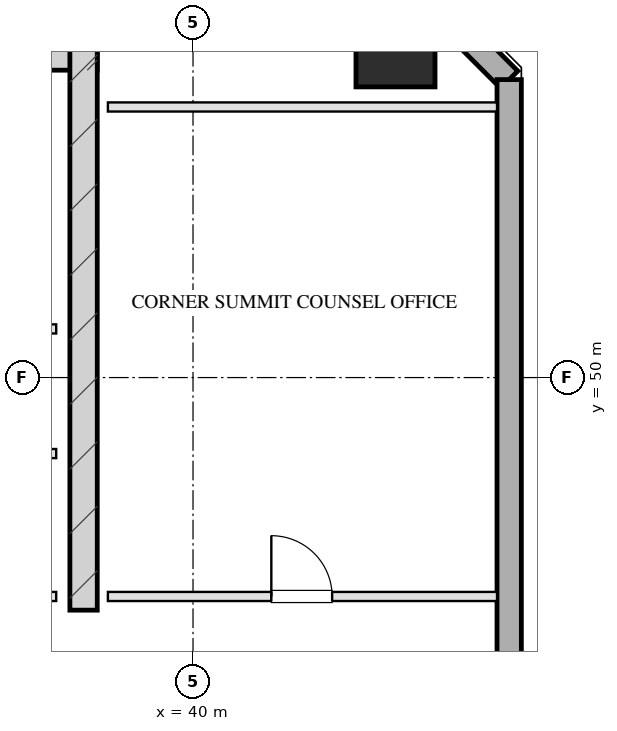
"""IFC4 building model, lengths in metres.
Left out: names, types, materials, properties, quantities, classifications, styles, units other than length and angle.
Written with IfcOpenShell. Run it as: python <this file> out.ifc"""

import sys

from ifc_helpers import new_model, si_unit, direction, frame, frame_2d, origin, origin_2d, place, context, subcontext, project, spatial, rectangle, hollow_rectangle, extrude, element, fill, save


model = new_model("IFC4")
c1 = context("Model", 3, precision=1e-05, world=origin(), true_north=direction((0.0, 1.0)))
c2 = subcontext(c1, "Body", "Model", "MODEL_VIEW")
j1 = project(units=[si_unit("LENGTHUNIT", "METRE"), si_unit("PLANEANGLEUNIT", "RADIAN")], contexts=[c1])
p1 = place(None, origin())
s1 = spatial("IfcSite", under=j1, at=p1, CompositionType="ELEMENT")
p2 = place(p1, origin())
s2 = spatial("IfcBuilding", under=s1, at=p2, CompositionType="ELEMENT")
p3 = place(p2, frame((0.0, 0.0, 263.2)))
s3 = spatial("IfcBuildingStorey", under=s2, at=p3, CompositionType="ELEMENT", Elevation=263.2)
p4 = place(p3, frame((21.575, 55.28, 0.0), z_axis=(0.0, 0.0, 1.0), x_axis=(1.0, 0.0, 0.0)))
e1 = element("IfcWall", 1, at=p4, inside=s3, PredefinedType="SHEAR", context=c2, shape_type="SweptSolid", body=[
    extrude(rectangle(XDim=16.85, YDim=0.45, at=frame_2d((8.425, 0.0))), origin(), (0.0, 0.0, 1.0), 3.2),
])
p5 = place(p3, frame((38.2, 46.175, 0.0), z_axis=(0.0, 0.0, 1.0), x_axis=(0.0, 1.0, 0.0)))
e2 = element("IfcWall", 2, at=p5, inside=s3, PredefinedType="SHEAR", context=c2, shape_type="SweptSolid", body=[
    extrude(rectangle(XDim=9.33, YDim=0.45, at=frame_2d((4.665, 0.0))), origin(), (0.0, 0.0, 1.0), 3.2),
])
p6 = place(p3, frame((43.33, 55.43, 0.0), z_axis=(0.0, 0.0, 1.0), x_axis=(1.0, 0.0, 0.0)))
e3 = element("IfcColumn", 3, at=p6, inside=s3, PredefinedType="COLUMN", context=c2, shape_type="SweptSolid", body=[
    extrude(hollow_rectangle(XDim=1.3, YDim=1.3, WallThickness=0.045, at=origin_2d()), origin(), (0.0, 0.0, 1.0), 3.201),
])
p7 = place(p3, frame((42.8, 57.3, 0.0), z_axis=(0.0, 0.0, 1.0), x_axis=(0.707070815327, -0.707142745217, 0.0)))
e4 = element("IfcWall", 4, at=p7, inside=s3, PredefinedType="SOLIDWALL", context=c2, shape_type="SweptSolid", body=[
    extrude(rectangle(XDim=3.394, YDim=0.4, at=frame_2d((1.697, 0.0))), origin(), (0.0, 0.0, 1.0), 2.36),
])
p8 = place(p3, frame((45.2, 54.9, 0.0), z_axis=(0.0, 0.0, 1.0), x_axis=(0.0, -1.0, 0.0)))
e5 = element("IfcWall", 5, at=p8, inside=s3, PredefinedType="SOLIDWALL", context=c2, shape_type="SweptSolid", body=[
    extrude(rectangle(XDim=41.8, YDim=0.4, at=frame_2d((20.9, 0.0))), origin(), (0.0, 0.0, 1.0), 2.36),
])
p9 = place(p8, frame((26.325, 0.0, 0.75)))
e6 = element("IfcOpeningElement", 6, at=p9, cuts=e5, PredefinedType="OPENING", context=c2, shape_type="SweptSolid", body=[
    extrude(rectangle(XDim=1.95, YDim=1.21, at=frame_2d((0.975, 0.605))), frame((0.0, 0.21, 0.0), z_axis=(0.0, -1.0, 0.0), x_axis=(1.0, 0.0, 0.0)), (0.0, 0.0, 1.0), 0.42),
])
p10 = place(p8, frame((22.525, 0.0, 0.75)))
e7 = element("IfcOpeningElement", 7, at=p10, cuts=e5, PredefinedType="OPENING", context=c2, shape_type="SweptSolid", body=[
    extrude(rectangle(XDim=1.95, YDim=1.21, at=frame_2d((0.975, 0.605))), frame((0.0, 0.21, 0.0), z_axis=(0.0, -1.0, 0.0), x_axis=(1.0, 0.0, 0.0)), (0.0, 0.0, 1.0), 0.42),
])
p11 = place(p8, frame((17.325, 0.0, 0.75)))
e8 = element("IfcOpeningElement", 8, at=p11, cuts=e5, PredefinedType="OPENING", context=c2, shape_type="SweptSolid", body=[
    extrude(rectangle(XDim=1.95, YDim=1.21, at=frame_2d((0.975, 0.605))), frame((0.0, 0.21, 0.0), z_axis=(0.0, -1.0, 0.0), x_axis=(1.0, 0.0, 0.0)), (0.0, 0.0, 1.0), 0.42),
])
p12 = place(p8, frame((13.525, 0.0, 0.75)))
e9 = element("IfcOpeningElement", 9, at=p12, cuts=e5, PredefinedType="OPENING", context=c2, shape_type="SweptSolid", body=[
    extrude(rectangle(XDim=1.95, YDim=1.21, at=frame_2d((0.975, 0.605))), frame((0.0, 0.21, 0.0), z_axis=(0.0, -1.0, 0.0), x_axis=(1.0, 0.0, 0.0)), (0.0, 0.0, 1.0), 0.42),
])
p13 = place(p3, frame((33.95, 46.4, 0.0), z_axis=(0.0, 0.0, 1.0), x_axis=(1.0, 0.0, 0.0)))
e10 = element("IfcWall", 10, at=p13, inside=s3, PredefinedType="PARTITIONING", context=c2, shape_type="SweptSolid", body=[
    extrude(rectangle(XDim=3.8, YDim=0.15, at=frame_2d((1.9, 0.0))), origin(), (0.0, 0.0, 1.0), 2.925),
])
p14 = place(p13, frame((0.22, 0.0, 0.0)))
e11 = element("IfcOpeningElement", 11, at=p14, cuts=e10, PredefinedType="OPENING", context=c2, shape_type="SweptSolid", body=[
    extrude(rectangle(XDim=0.95, YDim=2.05, at=frame_2d((0.475, 1.025))), frame((0.0, 0.085, 0.0), z_axis=(0.0, -1.0, 0.0), x_axis=(1.0, 0.0, 0.0)), (0.0, 0.0, 1.0), 0.17),
])
p15 = place(p13, frame((1.95, 0.0, 0.0)))
e12 = element("IfcOpeningElement", 12, at=p15, cuts=e10, PredefinedType="OPENING", context=c2, shape_type="SweptSolid", body=[
    extrude(rectangle(XDim=0.9, YDim=2.05, at=frame_2d((0.45, 1.025))), frame((0.0, 0.085, 0.0), z_axis=(0.0, -1.0, 0.0), x_axis=(1.0, 0.0, 0.0)), (0.0, 0.0, 1.0), 0.17),
])
for number, where, z_axis, x_axis in (
    (13, (35.45, 50.8, 0.0), (0.0, 0.0, 1.0), (1.0, 0.0, 0.0)),
    (14, (35.45, 48.75, 0.0), (0.0, 0.0, 1.0), (1.0, 0.0, 0.0)),
):
    element("IfcWall", number, at=place(p3, frame(where, z_axis=z_axis, x_axis=x_axis)), inside=s3, PredefinedType="PARTITIONING", context=c2, shape_type="SweptSolid", body=[
        extrude(rectangle(XDim=2.3, YDim=0.15, at=frame_2d((1.15, 0.0))), origin(), (0.0, 0.0, 1.0), 2.925),
    ])
p16 = place(p3, frame((38.6, 54.45, 0.0), z_axis=(0.0, 0.0, 1.0), x_axis=(1.0, 0.0, 0.0)))
e15 = element("IfcWall", 15, at=p16, inside=s3, PredefinedType="PARTITIONING", context=c2, shape_type="SweptSolid", body=[
    extrude(rectangle(XDim=6.4, YDim=0.15, at=frame_2d((3.2, 0.0))), origin(), (0.0, 0.0, 1.0), 2.925),
])
p17 = place(p3, frame((38.6, 46.4, 0.0), z_axis=(0.0, 0.0, 1.0), x_axis=(1.0, 0.0, 0.0)))
e16 = element("IfcWall", 16, at=p17, inside=s3, PredefinedType="PARTITIONING", context=c2, shape_type="SweptSolid", body=[
    extrude(rectangle(XDim=6.4, YDim=0.15, at=frame_2d((3.2, 0.0))), origin(), (0.0, 0.0, 1.0), 2.925),
])
p18 = place(p17, frame((2.688, 0.0, 0.0)))
e17 = element("IfcOpeningElement", 17, at=p18, cuts=e16, PredefinedType="OPENING", context=c2, shape_type="SweptSolid", body=[
    extrude(rectangle(XDim=1.0, YDim=2.05, at=frame_2d((0.5, 1.025))), frame((0.0, 0.085, 0.0), z_axis=(0.0, -1.0, 0.0), x_axis=(1.0, 0.0, 0.0)), (0.0, 0.0, 1.0), 0.17),
])
p19 = place(p18, origin())
e18 = element("IfcDoor", 18, at=p19, inside=s3, OperationType="SINGLE_SWING_LEFT", PredefinedType="DOOR", context=c2, shape_type="SweptSolid", body=[
    extrude(rectangle(XDim=1.0, YDim=2.05, at=frame_2d((0.5, 1.025))), frame((0.0, 0.025, 0.0), z_axis=(0.0, -1.0, 0.0), x_axis=(1.0, 0.0, 0.0)), (0.0, 0.0, 1.0), 0.05),
])
fill(e17, e18)
save(model, sys.argv[1])
